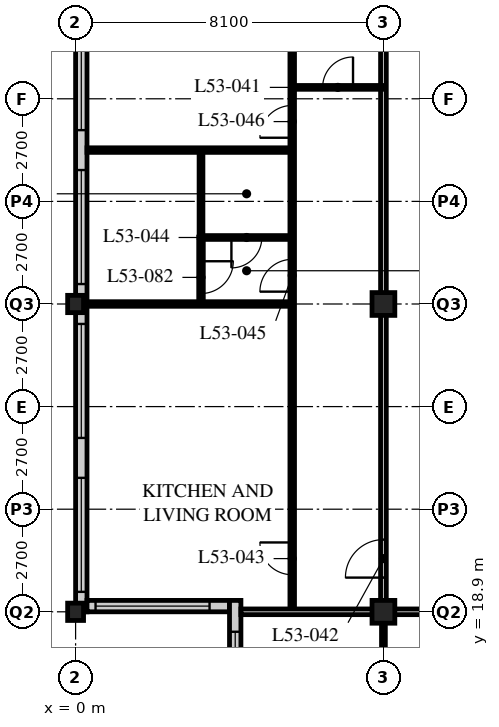
"""IFC4 building model, lengths in metres.
Left out: names, types, materials, properties, quantities, classifications, styles, units other than length and angle.
Written with IfcOpenShell. Run it as: python <this file> out.ifc"""

import sys

from ifc_helpers import new_model, si_unit, direction, frame, frame_2d, origin, origin_2d, place, context, subcontext, project, spatial, rectangle, hollow_rectangle, i_section, extrude, element, fill, save


model = new_model("IFC4")
c1 = context("Model", 3, precision=1e-05, world=origin(), true_north=direction((0.0, 1.0)))
c2 = subcontext(c1, "Body", "Model", "MODEL_VIEW")
j1 = project(units=[si_unit("LENGTHUNIT", "METRE"), si_unit("PLANEANGLEUNIT", "RADIAN")], contexts=[c1])
p1 = place(None, origin())
s1 = spatial("IfcSite", under=j1, at=p1, CompositionType="ELEMENT")
p2 = place(p1, origin())
s2 = spatial("IfcBuilding", under=s1, at=p2, CompositionType="ELEMENT")
p3 = place(p2, frame((0.0, 0.0, 206.4)))
s3 = spatial("IfcBuildingStorey", under=s2, at=p3, CompositionType="ELEMENT", Elevation=206.4)
for number, where, z_axis, x_axis in (
    (1, (0.0, 18.9, 0.0), (0.0, 0.0, 1.0), (1.0, 0.0, 0.0)),
    (2, (0.0, 27.0, 0.0), (0.0, 0.0, 1.0), (1.0, 0.0, 0.0)),
):
    element("IfcColumn", number, at=place(p3, frame(where, z_axis=z_axis, x_axis=x_axis)), inside=s3, PredefinedType="COLUMN", context=c2, shape_type="SweptSolid", body=[
        extrude(i_section(OverallWidth=0.418, OverallDepth=0.456, WebThickness=0.042, FlangeThickness=0.067, FilletRadius=0.015, at=origin_2d()), origin(), (0.0, 0.0, 1.0), 3.6),
    ])
for number, where, z_axis, x_axis in (
    (3, (8.1, 18.9, 0.0), (0.0, 0.0, 1.0), (1.0, 0.0, 0.0)),
    (4, (8.1, 27.0, 0.0), (0.0, 0.0, 1.0), (1.0, 0.0, 0.0)),
):
    element("IfcColumn", number, at=place(p3, frame(where, z_axis=z_axis, x_axis=x_axis)), inside=s3, PredefinedType="COLUMN", context=c2, shape_type="SweptSolid", body=[
        extrude(hollow_rectangle(XDim=0.6, YDim=0.6, WallThickness=0.05, at=origin_2d()), origin(), (0.0, 0.0, 1.0), 3.6),
    ])
p4 = place(p3, frame((0.15, 51.0, 0.0), z_axis=(0.0, 0.0, 1.0), x_axis=(0.0, -1.0, 0.0)))
e5 = element("IfcWall", 5, at=p4, inside=s3, PredefinedType="SOLIDWALL", context=c2, shape_type="SweptSolid", body=[
    extrude(rectangle(XDim=32.1, YDim=0.3, at=frame_2d((16.05, 0.0))), origin(), (0.0, 0.0, 1.0), 3.39),
])
p5 = place(p4, frame((0.225, 0.0, 0.6)))
e6 = element("IfcOpeningElement", 6, at=p5, cuts=e5, PredefinedType="OPENING", context=c2, shape_type="SweptSolid", body=[
    extrude(rectangle(XDim=3.0, YDim=2.4, at=frame_2d((1.5, 1.2))), frame((0.0, 0.16, 0.0), z_axis=(0.0, -1.0, 0.0), x_axis=(1.0, 0.0, 0.0)), (0.0, 0.0, 1.0), 0.32),
])
p6 = place(p4, frame((4.275, 0.0, 0.6)))
e7 = element("IfcOpeningElement", 7, at=p6, cuts=e5, PredefinedType="OPENING", context=c2, shape_type="SweptSolid", body=[
    extrude(rectangle(XDim=3.0, YDim=2.4, at=frame_2d((1.5, 1.2))), frame((0.0, 0.16, 0.0), z_axis=(0.0, -1.0, 0.0), x_axis=(1.0, 0.0, 0.0)), (0.0, 0.0, 1.0), 0.32),
])
p7 = place(p4, frame((8.325, 0.0, 0.6)))
e8 = element("IfcOpeningElement", 8, at=p7, cuts=e5, PredefinedType="OPENING", context=c2, shape_type="SweptSolid", body=[
    extrude(rectangle(XDim=3.0, YDim=2.4, at=frame_2d((1.5, 1.2))), frame((0.0, 0.16, 0.0), z_axis=(0.0, -1.0, 0.0), x_axis=(1.0, 0.0, 0.0)), (0.0, 0.0, 1.0), 0.32),
])
p8 = place(p4, frame((12.375, 0.0, 0.6)))
e9 = element("IfcOpeningElement", 9, at=p8, cuts=e5, PredefinedType="OPENING", context=c2, shape_type="SweptSolid", body=[
    extrude(rectangle(XDim=3.0, YDim=2.4, at=frame_2d((1.5, 1.2))), frame((0.0, 0.16, 0.0), z_axis=(0.0, -1.0, 0.0), x_axis=(1.0, 0.0, 0.0)), (0.0, 0.0, 1.0), 0.32),
])
p9 = place(p4, frame((16.425, 0.0, 0.6)))
e10 = element("IfcOpeningElement", 10, at=p9, cuts=e5, PredefinedType="OPENING", context=c2, shape_type="SweptSolid", body=[
    extrude(rectangle(XDim=3.0, YDim=2.4, at=frame_2d((1.5, 1.2))), frame((0.0, 0.16, 0.0), z_axis=(0.0, -1.0, 0.0), x_axis=(1.0, 0.0, 0.0)), (0.0, 0.0, 1.0), 0.32),
])
p10 = place(p4, frame((20.475, 0.0, 0.6)))
e11 = element("IfcOpeningElement", 11, at=p10, cuts=e5, PredefinedType="OPENING", context=c2, shape_type="SweptSolid", body=[
    extrude(rectangle(XDim=3.0, YDim=2.4, at=frame_2d((1.5, 1.2))), frame((0.0, 0.16, 0.0), z_axis=(0.0, -1.0, 0.0), x_axis=(1.0, 0.0, 0.0)), (0.0, 0.0, 1.0), 0.32),
])
p11 = place(p4, frame((24.525, 0.0, 0.6)))
e12 = element("IfcOpeningElement", 12, at=p11, cuts=e5, PredefinedType="OPENING", context=c2, shape_type="SweptSolid", body=[
    extrude(rectangle(XDim=3.0, YDim=2.4, at=frame_2d((1.5, 1.2))), frame((0.0, 0.16, 0.0), z_axis=(0.0, -1.0, 0.0), x_axis=(1.0, 0.0, 0.0)), (0.0, 0.0, 1.0), 0.32),
])
p12 = place(p4, frame((28.575, 0.0, 0.6)))
e13 = element("IfcOpeningElement", 13, at=p12, cuts=e5, PredefinedType="OPENING", context=c2, shape_type="SweptSolid", body=[
    extrude(rectangle(XDim=3.0, YDim=2.4, at=frame_2d((1.5, 1.2))), frame((0.0, 0.16, 0.0), z_axis=(0.0, -1.0, 0.0), x_axis=(1.0, 0.0, 0.0)), (0.0, 0.0, 1.0), 0.32),
])
p13 = place(p3, frame((0.3, 19.05, 0.0), z_axis=(0.0, 0.0, 1.0), x_axis=(1.0, 0.0, 0.0)))
e14 = element("IfcWall", 14, at=p13, inside=s3, PredefinedType="SOLIDWALL", context=c2, shape_type="SweptSolid", body=[
    extrude(rectangle(XDim=3.75, YDim=0.3, at=frame_2d((1.875, 0.0))), origin(), (0.0, 0.0, 1.0), 3.39),
])
p14 = place(p13, frame((0.225, 0.0, 0.6)))
e15 = element("IfcOpeningElement", 15, at=p14, cuts=e14, PredefinedType="OPENING", context=c2, shape_type="SweptSolid", body=[
    extrude(rectangle(XDim=3.0, YDim=2.0, at=frame_2d((1.5, 1.0))), frame((0.0, 0.16, 0.0), z_axis=(0.0, -1.0, 0.0), x_axis=(1.0, 0.0, 0.0)), (0.0, 0.0, 1.0), 0.32),
])
p15 = place(p3, frame((4.2, 19.2, 0.0), z_axis=(0.0, 0.0, 1.0), x_axis=(0.0, -1.0, 0.0)))
e16 = element("IfcWall", 16, at=p15, inside=s3, PredefinedType="SOLIDWALL", context=c2, shape_type="SweptSolid", body=[
    extrude(rectangle(XDim=4.35, YDim=0.3, at=frame_2d((2.175, 0.0))), origin(), (0.0, 0.0, 1.0), 3.39),
])
p16 = place(p15, frame((0.825, 0.0, 0.6)))
e17 = element("IfcOpeningElement", 17, at=p16, cuts=e16, PredefinedType="OPENING", context=c2, shape_type="SweptSolid", body=[
    extrude(rectangle(XDim=3.0, YDim=2.0, at=frame_2d((1.5, 1.0))), frame((0.0, 0.16, 0.0), z_axis=(0.0, -1.0, 0.0), x_axis=(1.0, 0.0, 0.0)), (0.0, 0.0, 1.0), 0.32),
])
p17 = place(p3, frame((8.1, 18.9, 0.0), z_axis=(0.0, 0.0, 1.0), x_axis=(1.0, 0.0, 0.0)))
e18 = element("IfcWall", 18, at=p17, inside=s3, PredefinedType="PARTITIONING", context=c2, shape_type="SweptSolid", body=[
    extrude(rectangle(XDim=36.45, YDim=0.15, at=frame_2d((18.225, 0.0))), origin(), (0.0, 0.0, 1.0), 2.778),
])
p18 = place(p17, frame((4.45, 0.0, 0.0)))
e19 = element("IfcOpeningElement", 19, at=p18, cuts=e18, PredefinedType="OPENING", context=c2, shape_type="SweptSolid", body=[
    extrude(rectangle(XDim=1.0, YDim=2.1, at=frame_2d((0.5, 1.05))), frame((0.0, 0.085, 0.0), z_axis=(0.0, -1.0, 0.0), x_axis=(1.0, 0.0, 0.0)), (0.0, 0.0, 1.0), 0.17),
])
p19 = place(p17, frame((12.55, 0.0, 0.0)))
e20 = element("IfcOpeningElement", 20, at=p19, cuts=e18, PredefinedType="OPENING", context=c2, shape_type="SweptSolid", body=[
    extrude(rectangle(XDim=1.0, YDim=2.1, at=frame_2d((0.5, 1.05))), frame((0.0, 0.085, 0.0), z_axis=(0.0, -1.0, 0.0), x_axis=(1.0, 0.0, 0.0)), (0.0, 0.0, 1.0), 0.17),
])
p20 = place(p17, frame((29.05, 0.0, 0.0)))
e21 = element("IfcOpeningElement", 21, at=p20, cuts=e18, PredefinedType="OPENING", context=c2, shape_type="SweptSolid", body=[
    extrude(rectangle(XDim=1.0, YDim=2.1, at=frame_2d((0.5, 1.05))), frame((0.0, 0.085, 0.0), z_axis=(0.0, -1.0, 0.0), x_axis=(1.0, 0.0, 0.0)), (0.0, 0.0, 1.0), 0.17),
])
p21 = place(p17, frame((2.625, 0.0, 0.0)))
e22 = element("IfcOpeningElement", 22, at=p21, cuts=e18, PredefinedType="OPENING", context=c2, shape_type="SweptSolid", body=[
    extrude(rectangle(XDim=1.0, YDim=2.1, at=frame_2d((0.5, 1.05))), frame((0.0, 0.085, 0.0), z_axis=(0.0, -1.0, 0.0), x_axis=(1.0, 0.0, 0.0)), (0.0, 0.0, 1.0), 0.17),
])
p22 = place(p17, frame((33.925, 0.0, 0.0)))
e23 = element("IfcOpeningElement", 23, at=p22, cuts=e18, PredefinedType="OPENING", context=c2, shape_type="SweptSolid", body=[
    extrude(rectangle(XDim=1.0, YDim=2.1, at=frame_2d((0.5, 1.05))), frame((0.0, 0.085, 0.0), z_axis=(0.0, -1.0, 0.0), x_axis=(1.0, 0.0, 0.0)), (0.0, 0.0, 1.0), 0.17),
])
p23 = place(p3, frame((8.1, 18.9, 0.0), z_axis=(0.0, 0.0, 1.0), x_axis=(0.0, 1.0, 0.0)))
e24 = element("IfcWall", 24, at=p23, inside=s3, PredefinedType="PARTITIONING", context=c2, shape_type="SweptSolid", body=[
    extrude(rectangle(XDim=28.35, YDim=0.15, at=frame_2d((14.175, 0.0))), origin(), (0.0, 0.0, 1.0), 2.778),
])
p24 = place(p23, frame((0.9, 0.0, 0.0)))
e25 = element("IfcOpeningElement", 25, at=p24, cuts=e24, PredefinedType="OPENING", context=c2, shape_type="SweptSolid", body=[
    extrude(rectangle(XDim=1.0, YDim=2.1, at=frame_2d((0.5, 1.05))), frame((0.0, 0.085, 0.0), z_axis=(0.0, -1.0, 0.0), x_axis=(1.0, 0.0, 0.0)), (0.0, 0.0, 1.0), 0.17),
])
p25 = place(p23, frame((17.1, 0.0, 0.0)))
e26 = element("IfcOpeningElement", 26, at=p25, cuts=e24, PredefinedType="OPENING", context=c2, shape_type="SweptSolid", body=[
    extrude(rectangle(XDim=1.0, YDim=2.1, at=frame_2d((0.5, 1.05))), frame((0.0, 0.085, 0.0), z_axis=(0.0, -1.0, 0.0), x_axis=(1.0, 0.0, 0.0)), (0.0, 0.0, 1.0), 0.17),
])
p26 = place(p23, frame((26.65, 0.0, 0.0)))
e27 = element("IfcOpeningElement", 27, at=p26, cuts=e24, PredefinedType="OPENING", context=c2, shape_type="SweptSolid", body=[
    extrude(rectangle(XDim=1.0, YDim=2.1, at=frame_2d((0.5, 1.05))), frame((0.0, 0.085, 0.0), z_axis=(0.0, -1.0, 0.0), x_axis=(1.0, 0.0, 0.0)), (0.0, 0.0, 1.0), 0.17),
])
p27 = place(p3, frame((5.7, 18.9, 0.0), z_axis=(0.0, 0.0, 1.0), x_axis=(0.0, 1.0, 0.0)))
e28 = element("IfcWall", 28, at=p27, inside=s3, PredefinedType="PARTITIONING", context=c2, shape_type="SweptSolid", body=[
    extrude(rectangle(XDim=24.3, YDim=0.12, at=frame_2d((12.15, 0.0))), origin(), (0.0, 0.0, 1.0), 3.39),
])
p28 = place(p27, frame((0.975, 0.0, 0.0)))
e29 = element("IfcOpeningElement", 29, at=p28, cuts=e28, PredefinedType="OPENING", context=c2, shape_type="SweptSolid", body=[
    extrude(rectangle(XDim=0.85, YDim=2.1, at=frame_2d((0.425, 1.05))), frame((0.0, 0.07, 0.0), z_axis=(0.0, -1.0, 0.0), x_axis=(1.0, 0.0, 0.0)), (0.0, 0.0, 1.0), 0.14),
])
p29 = place(p27, frame((8.425, 0.0, 0.0)))
e30 = element("IfcOpeningElement", 30, at=p29, cuts=e28, PredefinedType="OPENING", context=c2, shape_type="SweptSolid", body=[
    extrude(rectangle(XDim=0.85, YDim=2.1, at=frame_2d((0.425, 1.05))), frame((0.0, 0.07, 0.0), z_axis=(0.0, -1.0, 0.0), x_axis=(1.0, 0.0, 0.0)), (0.0, 0.0, 1.0), 0.14),
])
p30 = place(p27, frame((12.475, 0.0, 0.0)))
e31 = element("IfcOpeningElement", 31, at=p30, cuts=e28, PredefinedType="OPENING", context=c2, shape_type="SweptSolid", body=[
    extrude(rectangle(XDim=0.85, YDim=2.1, at=frame_2d((0.425, 1.05))), frame((0.0, 0.07, 0.0), z_axis=(0.0, -1.0, 0.0), x_axis=(1.0, 0.0, 0.0)), (0.0, 0.0, 1.0), 0.14),
])
p31 = place(p27, frame((17.175, 0.0, 0.0)))
e32 = element("IfcOpeningElement", 32, at=p31, cuts=e28, PredefinedType="OPENING", context=c2, shape_type="SweptSolid", body=[
    extrude(rectangle(XDim=0.85, YDim=2.1, at=frame_2d((0.425, 1.05))), frame((0.0, 0.07, 0.0), z_axis=(0.0, -1.0, 0.0), x_axis=(1.0, 0.0, 0.0)), (0.0, 0.0, 1.0), 0.14),
])
p32 = place(p27, frame((20.575, 0.0, 0.0)))
e33 = element("IfcOpeningElement", 33, at=p32, cuts=e28, PredefinedType="OPENING", context=c2, shape_type="SweptSolid", body=[
    extrude(rectangle(XDim=0.85, YDim=2.1, at=frame_2d((0.425, 1.05))), frame((0.0, 0.07, 0.0), z_axis=(0.0, -1.0, 0.0), x_axis=(1.0, 0.0, 0.0)), (0.0, 0.0, 1.0), 0.14),
])
p33 = place(p3, frame((8.1, 32.7, 0.0), z_axis=(0.0, 0.0, 1.0), x_axis=(-1.0, 0.0, 0.0)))
e34 = element("IfcWall", 34, at=p33, inside=s3, PredefinedType="PARTITIONING", context=c2, shape_type="SweptSolid", body=[
    extrude(rectangle(XDim=2.4, YDim=0.1, at=frame_2d((1.2, 0.0))), origin(), (0.0, 0.0, 1.0), 3.39),
])
p34 = place(p33, frame((0.8, 0.0, 0.0)))
e35 = element("IfcOpeningElement", 35, at=p34, cuts=e34, PredefinedType="OPENING", context=c2, shape_type="SweptSolid", body=[
    extrude(rectangle(XDim=0.8, YDim=2.1, at=frame_2d((0.4, 1.05))), frame((0.0, 0.06, 0.0), z_axis=(0.0, -1.0, 0.0), x_axis=(1.0, 0.0, 0.0)), (0.0, 0.0, 1.0), 0.12),
])
p35 = place(p3, frame((5.7, 28.75, 0.0), z_axis=(0.0, 0.0, 1.0), x_axis=(-1.0, 0.0, 0.0)))
e36 = element("IfcWall", 36, at=p35, inside=s3, PredefinedType="PARTITIONING", context=c2, shape_type="SweptSolid", body=[
    extrude(rectangle(XDim=2.4, YDim=0.1, at=frame_2d((1.2, 0.0))), origin(), (0.0, 0.0, 1.0), 3.39),
])
p36 = place(p35, frame((0.8, 0.0, 0.0)))
e37 = element("IfcOpeningElement", 37, at=p36, cuts=e36, PredefinedType="OPENING", context=c2, shape_type="SweptSolid", body=[
    extrude(rectangle(XDim=0.8, YDim=2.1, at=frame_2d((0.4, 1.05))), frame((0.0, 0.06, 0.0), z_axis=(0.0, -1.0, 0.0), x_axis=(1.0, 0.0, 0.0)), (0.0, 0.0, 1.0), 0.12),
])
p37 = place(p3, frame((3.3, 28.75, 0.0), z_axis=(0.0, 0.0, 1.0), x_axis=(0.0, 1.0, 0.0)))
e38 = element("IfcWall", 38, at=p37, inside=s3, PredefinedType="PARTITIONING", context=c2, shape_type="SweptSolid", body=[
    extrude(rectangle(XDim=2.3, YDim=0.1, at=frame_2d((1.15, 0.0))), origin(), (0.0, 0.0, 1.0), 3.39),
])
p38 = place(p3, frame((5.7, 27.0, 0.0), z_axis=(0.0, 0.0, 1.0), x_axis=(-1.0, 0.0, 0.0)))
e39 = element("IfcWall", 39, at=p38, inside=s3, PredefinedType="PARTITIONING", context=c2, shape_type="SweptSolid", body=[
    extrude(rectangle(XDim=5.4, YDim=0.12, at=frame_2d((2.7, 0.0))), origin(), (0.0, 0.0, 1.0), 2.778),
])
p39 = place(p3, frame((5.7, 31.05, 0.0), z_axis=(0.0, 0.0, 1.0), x_axis=(-1.0, 0.0, 0.0)))
e40 = element("IfcWall", 40, at=p39, inside=s3, PredefinedType="PARTITIONING", context=c2, shape_type="SweptSolid", body=[
    extrude(rectangle(XDim=5.4, YDim=0.12, at=frame_2d((2.7, 0.0))), origin(), (0.0, 0.0, 1.0), 3.39),
])
p40 = place(p3, frame((8.1, 18.9, 0.0), z_axis=(0.0, 0.0, 1.0), x_axis=(0.0, -1.0, 0.0)))
e41 = element("IfcWall", 41, at=p40, inside=s3, PredefinedType="PARTITIONING", context=c2, shape_type="SweptSolid", body=[
    extrude(rectangle(XDim=2.4, YDim=0.1, at=frame_2d((1.2, 0.0))), origin(), (0.0, 0.0, 1.0), 2.778),
])
p41 = place(p3, frame((4.35, 18.9, 0.0), z_axis=(0.0, 0.0, 1.0), x_axis=(1.0, 0.0, 0.0)))
e42 = element("IfcWall", 42, at=p41, inside=s3, PredefinedType="PARTITIONING", context=c2, shape_type="SweptSolid", body=[
    extrude(rectangle(XDim=3.75, YDim=0.15, at=frame_2d((1.875, 0.0))), origin(), (0.0, 0.0, 1.0), 2.778),
])
p42 = place(p3, frame((3.3, 27.0, 0.0), z_axis=(0.0, 0.0, 1.0), x_axis=(0.0, 1.0, 0.0)))
e43 = element("IfcWall", 43, at=p42, inside=s3, PredefinedType="PARTITIONING", context=c2, shape_type="SweptSolid", body=[
    extrude(rectangle(XDim=1.76, YDim=0.12, at=frame_2d((0.88, 0.0))), origin(), (0.0, 0.0, 1.0), 3.39),
])
p43 = place(p42, frame((0.275, 0.0, 0.0)))
e44 = element("IfcOpeningElement", 44, at=p43, cuts=e43, PredefinedType="OPENING", context=c2, shape_type="SweptSolid", body=[
    extrude(rectangle(XDim=0.85, YDim=2.1, at=frame_2d((0.425, 1.05))), frame((0.0, 0.07, 0.0), z_axis=(0.0, -1.0, 0.0), x_axis=(1.0, 0.0, 0.0)), (0.0, 0.0, 1.0), 0.14),
])
p44 = place(p9, origin())
e45 = element("IfcWindow", 45, at=p44, inside=s3, PartitioningType="SINGLE_PANEL", PredefinedType="WINDOW", context=c2, shape_type="SweptSolid", body=[
    extrude(rectangle(XDim=3.0, YDim=2.4, at=frame_2d((1.5, 1.2))), frame((0.0, 0.03, 0.0), z_axis=(0.0, -1.0, 0.0), x_axis=(1.0, 0.0, 0.0)), (0.0, 0.0, 1.0), 0.06),
])
fill(e10, e45)
p45 = place(p10, origin())
e46 = element("IfcWindow", 46, at=p45, inside=s3, PartitioningType="SINGLE_PANEL", PredefinedType="WINDOW", context=c2, shape_type="SweptSolid", body=[
    extrude(rectangle(XDim=3.0, YDim=2.4, at=frame_2d((1.5, 1.2))), frame((0.0, 0.03, 0.0), z_axis=(0.0, -1.0, 0.0), x_axis=(1.0, 0.0, 0.0)), (0.0, 0.0, 1.0), 0.06),
])
fill(e11, e46)
p46 = place(p11, origin())
e47 = element("IfcWindow", 47, at=p46, inside=s3, PartitioningType="SINGLE_PANEL", PredefinedType="WINDOW", context=c2, shape_type="SweptSolid", body=[
    extrude(rectangle(XDim=3.0, YDim=2.4, at=frame_2d((1.5, 1.2))), frame((0.0, 0.03, 0.0), z_axis=(0.0, -1.0, 0.0), x_axis=(1.0, 0.0, 0.0)), (0.0, 0.0, 1.0), 0.06),
])
fill(e12, e47)
p47 = place(p12, origin())
e48 = element("IfcWindow", 48, at=p47, inside=s3, PartitioningType="SINGLE_PANEL", PredefinedType="WINDOW", context=c2, shape_type="SweptSolid", body=[
    extrude(rectangle(XDim=3.0, YDim=2.4, at=frame_2d((1.5, 1.2))), frame((0.0, 0.03, 0.0), z_axis=(0.0, -1.0, 0.0), x_axis=(1.0, 0.0, 0.0)), (0.0, 0.0, 1.0), 0.06),
])
fill(e13, e48)
p48 = place(p14, origin())
e49 = element("IfcWindow", 49, at=p48, inside=s3, PartitioningType="SINGLE_PANEL", PredefinedType="WINDOW", context=c2, shape_type="SweptSolid", body=[
    extrude(rectangle(XDim=3.0, YDim=2.0, at=frame_2d((1.5, 1.0))), frame((0.0, 0.03, 0.0), z_axis=(0.0, -1.0, 0.0), x_axis=(1.0, 0.0, 0.0)), (0.0, 0.0, 1.0), 0.06),
])
fill(e15, e49)
p49 = place(p16, origin())
e50 = element("IfcWindow", 50, at=p49, inside=s3, PartitioningType="SINGLE_PANEL", PredefinedType="WINDOW", context=c2, shape_type="SweptSolid", body=[
    extrude(rectangle(XDim=3.0, YDim=2.0, at=frame_2d((1.5, 1.0))), frame((0.0, 0.03, 0.0), z_axis=(0.0, -1.0, 0.0), x_axis=(1.0, 0.0, 0.0)), (0.0, 0.0, 1.0), 0.06),
])
fill(e17, e50)
p50 = place(p34, origin())
e51 = element("IfcDoor", 51, at=p50, inside=s3, OperationType="SINGLE_SWING_RIGHT", PredefinedType="DOOR", context=c2, shape_type="SweptSolid", body=[
    extrude(rectangle(XDim=0.8, YDim=2.1, at=frame_2d((0.4, 1.05))), frame((0.0, 0.025, 0.0), z_axis=(0.0, -1.0, 0.0), x_axis=(1.0, 0.0, 0.0)), (0.0, 0.0, 1.0), 0.05),
])
fill(e35, e51)
p51 = place(p24, origin())
e52 = element("IfcDoor", 52, at=p51, inside=s3, OperationType="SINGLE_SWING_LEFT", PredefinedType="DOOR", context=c2, shape_type="SweptSolid", body=[
    extrude(rectangle(XDim=1.0, YDim=2.1, at=frame_2d((0.5, 1.05))), frame((0.0, 0.025, 0.0), z_axis=(0.0, -1.0, 0.0), x_axis=(1.0, 0.0, 0.0)), (0.0, 0.0, 1.0), 0.05),
])
fill(e25, e52)
p52 = place(p28, origin())
e53 = element("IfcDoor", 53, at=p52, inside=s3, OperationType="SINGLE_SWING_RIGHT", PredefinedType="DOOR", context=c2, shape_type="SweptSolid", body=[
    extrude(rectangle(XDim=0.85, YDim=2.1, at=frame_2d((0.425, 1.05))), frame((0.0, 0.025, 0.0), z_axis=(0.0, -1.0, 0.0), x_axis=(1.0, 0.0, 0.0)), (0.0, 0.0, 1.0), 0.05),
])
fill(e29, e53)
p53 = place(p36, origin())
e54 = element("IfcDoor", 54, at=p53, inside=s3, OperationType="SINGLE_SWING_RIGHT", PredefinedType="DOOR", context=c2, shape_type="SweptSolid", body=[
    extrude(rectangle(XDim=0.8, YDim=2.1, at=frame_2d((0.4, 1.05))), frame((0.0, 0.025, 0.0), z_axis=(0.0, -1.0, 0.0), x_axis=(1.0, 0.0, 0.0)), (0.0, 0.0, 1.0), 0.05),
])
fill(e37, e54)
p54 = place(p29, origin())
e55 = element("IfcDoor", 55, at=p54, inside=s3, OperationType="SINGLE_SWING_LEFT", PredefinedType="DOOR", context=c2, shape_type="SweptSolid", body=[
    extrude(rectangle(XDim=0.85, YDim=2.1, at=frame_2d((0.425, 1.05))), frame((0.0, 0.025, 0.0), z_axis=(0.0, -1.0, 0.0), x_axis=(1.0, 0.0, 0.0)), (0.0, 0.0, 1.0), 0.05),
])
fill(e30, e55)
p55 = place(p30, origin())
e56 = element("IfcDoor", 56, at=p55, inside=s3, OperationType="SINGLE_SWING_LEFT", PredefinedType="DOOR", context=c2, shape_type="SweptSolid", body=[
    extrude(rectangle(XDim=0.85, YDim=2.1, at=frame_2d((0.425, 1.05))), frame((0.0, 0.025, 0.0), z_axis=(0.0, -1.0, 0.0), x_axis=(1.0, 0.0, 0.0)), (0.0, 0.0, 1.0), 0.05),
])
fill(e31, e56)
p56 = place(p43, origin())
e57 = element("IfcDoor", 57, at=p56, inside=s3, OperationType="SINGLE_SWING_LEFT", PredefinedType="DOOR", context=c2, shape_type="SweptSolid", body=[
    extrude(rectangle(XDim=0.85, YDim=2.1, at=frame_2d((0.425, 1.05))), frame((0.0, 0.025, 0.0), z_axis=(0.0, -1.0, 0.0), x_axis=(1.0, 0.0, 0.0)), (0.0, 0.0, 1.0), 0.05),
])
fill(e44, e57)
save(model, sys.argv[1])
